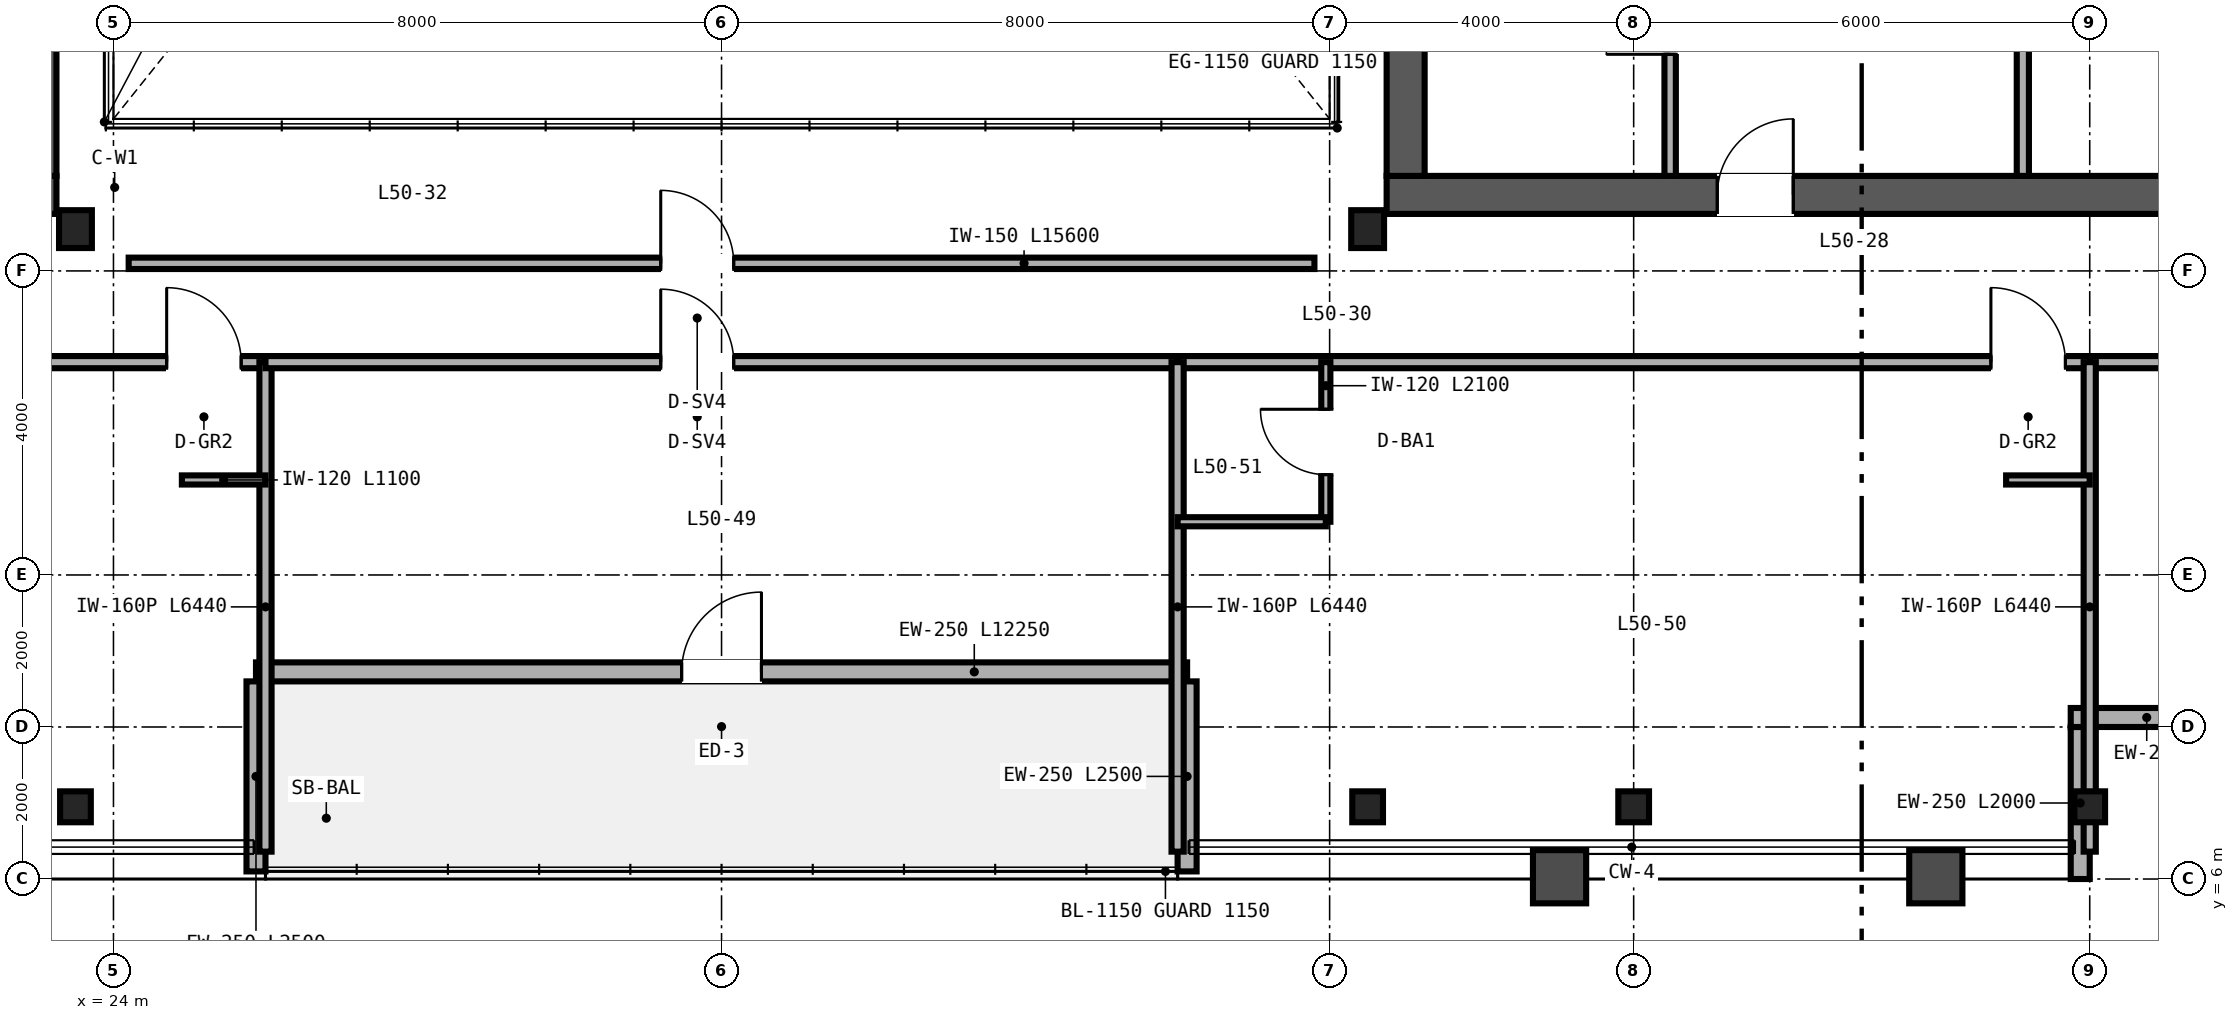
"""IFC4 building model, lengths in metres.
Left out: names, types, materials, properties, quantities, classifications, styles, units other than length and angle.
Written with IfcOpenShell. Run it as: python <this file> out.ifc"""

import sys

from ifc_helpers import new_model, si_unit, direction, frame, frame_2d, origin, origin_2d, place, context, subcontext, project, spatial, rectangle, i_section, extrude, source, transform, mapped, element, fill, save


model = new_model("IFC4")
c1 = context("Model", 3, precision=1e-05, world=origin(), true_north=direction((0.0, 1.0)))
c2 = subcontext(c1, "Body", "Model", "MODEL_VIEW")
j1 = project(units=[si_unit("LENGTHUNIT", "METRE"), si_unit("PLANEANGLEUNIT", "RADIAN")], contexts=[c1])
p1 = place(None, origin())
s1 = spatial("IfcSite", under=j1, at=p1, CompositionType="ELEMENT")
p2 = place(p1, origin())
s2 = spatial("IfcBuilding", under=s1, at=p2, CompositionType="ELEMENT")
p3 = place(p2, frame((0.0, 0.0, 199.2)))
s3 = spatial("IfcBuildingStorey", under=s2, at=p3, CompositionType="ELEMENT", Elevation=199.2)
p4 = place(p3, frame((10.75, 15.0, 0.0), z_axis=(0.0, 0.0, 1.0), x_axis=(1.0, 0.0, 0.0)))
e1 = element("IfcWall", 1, at=p4, inside=s3, PredefinedType="SHEAR", context=c2, shape_type="SweptSolid", body=[
    extrude(rectangle(XDim=12.5, YDim=0.5, at=frame_2d((6.25, 0.0))), origin(), (0.0, 0.0, 1.0), 3.37),
])
p5 = place(p4, frame((10.15, 0.0, 0.0)))
e2 = element("IfcOpeningElement", 2, at=p5, cuts=e1, PredefinedType="OPENING", context=c2, shape_type="SweptSolid", body=[
    extrude(rectangle(XDim=1.0, YDim=2.15, at=frame_2d((0.5, 1.075))), frame((0.0, 0.26, 0.0), z_axis=(0.0, -1.0, 0.0), x_axis=(1.0, 0.0, 0.0)), (0.0, 0.0, 1.0), 0.52),
])
p6 = place(p3, frame((23.0, 15.25, 0.0), z_axis=(0.0, 0.0, 1.0), x_axis=(0.0, 1.0, 0.0)))
e3 = element("IfcWall", 3, at=p6, inside=s3, PredefinedType="SHEAR", context=c2, shape_type="SweptSolid", body=[
    extrude(rectangle(XDim=21.5, YDim=0.5, at=frame_2d((10.75, 0.0))), origin(), (0.0, 0.0, 1.0), 3.37),
])
p7 = place(p3, frame((40.75, 15.0, 0.0), z_axis=(0.0, 0.0, 1.0), x_axis=(1.0, 0.0, 0.0)))
e4 = element("IfcWall", 4, at=p7, inside=s3, PredefinedType="SHEAR", context=c2, shape_type="SweptSolid", body=[
    extrude(rectangle(XDim=12.5, YDim=0.5, at=frame_2d((6.25, 0.0))), origin(), (0.0, 0.0, 1.0), 3.37),
])
p8 = place(p7, frame((4.35, 0.0, 0.0)))
e5 = element("IfcOpeningElement", 5, at=p8, cuts=e4, PredefinedType="OPENING", context=c2, shape_type="SweptSolid", body=[
    extrude(rectangle(XDim=1.0, YDim=2.15, at=frame_2d((0.5, 1.075))), frame((0.0, 0.26, 0.0), z_axis=(0.0, -1.0, 0.0), x_axis=(1.0, 0.0, 0.0)), (0.0, 0.0, 1.0), 0.52),
])
p9 = place(p3, frame((41.0, 15.25, 0.0), z_axis=(0.0, 0.0, 1.0), x_axis=(0.0, 1.0, 0.0)))
e6 = element("IfcWall", 6, at=p9, inside=s3, PredefinedType="SHEAR", context=c2, shape_type="SweptSolid", body=[
    extrude(rectangle(XDim=21.5, YDim=0.5, at=frame_2d((10.75, 0.0))), origin(), (0.0, 0.0, 1.0), 3.37),
])
m1 = source(origin(), c2, "Body", "SweptSolid", [
    extrude(i_section(OverallWidth=0.432, OverallDepth=0.498, WebThickness=0.056, FlangeThickness=0.089, FilletRadius=0.025, at=origin_2d()), origin(), (0.0, 0.0, 1.0), 3.37),
])
for number, where, z_axis, x_axis in (
    (7, (23.5, 14.55, 0.0), (0.0, 0.0, 1.0), (1.0, 0.0, 0.0)),
    (8, (40.5, 14.55, 0.0), (0.0, 0.0, 1.0), (1.0, 0.0, 0.0)),
):
    element("IfcColumn", number, at=place(p3, frame(where, z_axis=z_axis, x_axis=x_axis)), inside=s3, PredefinedType="COLUMN", context=c2, shape_type="MappedRepresentation", body=[
        mapped(m1, transform((0.0, 0.0, 0.0), scale=1.0)),
    ])
m2 = source(origin(), c2, "Body", "SweptSolid", [
    extrude(i_section(OverallWidth=0.404, OverallDepth=0.407, WebThickness=0.027, FlangeThickness=0.044, FilletRadius=0.025, at=origin_2d()), origin(), (0.0, 0.0, 1.0), 3.37),
])
for number, where, z_axis, x_axis in (
    (9, (23.5, 6.95, 0.0), (0.0, 0.0, 1.0), (1.0, 0.0, 0.0)),
    (10, (40.5, 6.95, 0.0), (0.0, 0.0, 1.0), (1.0, 0.0, 0.0)),
    (11, (44.0, 6.95, 0.0), (0.0, 0.0, 1.0), (1.0, 0.0, 0.0)),
    (12, (50.0, 6.95, 0.0), (0.0, 0.0, 1.0), (1.0, 0.0, 0.0)),
):
    element("IfcColumn", number, at=place(p3, frame(where, z_axis=z_axis, x_axis=x_axis)), inside=s3, PredefinedType="COLUMN", context=c2, shape_type="MappedRepresentation", body=[
        mapped(m2, transform((0.0, 0.0, 0.0), scale=1.0)),
    ])
p10 = place(p3, frame((49.875, 6.0, 0.0), z_axis=(0.0, 0.0, 1.0), x_axis=(0.0, 1.0, 0.0)))
e13 = element("IfcWall", 13, at=p10, inside=s3, PredefinedType="SOLIDWALL", context=c2, shape_type="SweptSolid", body=[
    extrude(rectangle(XDim=2.0, YDim=0.25, at=frame_2d((1.0, 0.0))), origin(), (0.0, 0.0, 1.0), 2.677),
])
p11 = place(p3, frame((49.75, 8.125, 0.0), z_axis=(0.0, 0.0, 1.0), x_axis=(1.0, 0.0, 0.0)))
e14 = element("IfcWall", 14, at=p11, inside=s3, PredefinedType="SOLIDWALL", context=c2, shape_type="SweptSolid", body=[
    extrude(rectangle(XDim=2.0, YDim=0.25, at=frame_2d((1.0, 0.0))), origin(), (0.0, 0.0, 1.0), 3.37),
])
p12 = place(p3, frame((25.875, 8.725, 0.0), z_axis=(0.0, 0.0, 1.0), x_axis=(1.0, 0.0, 0.0)))
e15 = element("IfcWall", 15, at=p12, inside=s3, PredefinedType="SOLIDWALL", context=c2, shape_type="SweptSolid", body=[
    extrude(rectangle(XDim=12.25, YDim=0.25, at=frame_2d((6.125, 0.0))), origin(), (0.0, 0.0, 1.0), 3.37),
])
p13 = place(p12, frame((5.6, 0.0, 0.0)))
e16 = element("IfcOpeningElement", 16, at=p13, cuts=e15, PredefinedType="OPENING", context=c2, shape_type="SweptSolid", body=[
    extrude(rectangle(XDim=1.05, YDim=2.15, at=frame_2d((0.525, 1.075))), frame((0.0, 0.135, 0.0), z_axis=(0.0, -1.0, 0.0), x_axis=(1.0, 0.0, 0.0)), (0.0, 0.0, 1.0), 0.27),
])
for number, where, z_axis, x_axis in (
    (17, (25.875, 6.1, 0.0), (0.0, 0.0, 1.0), (0.0, 1.0, 0.0)),
    (18, (38.125, 6.1, 0.0), (0.0, 0.0, 1.0), (0.0, 1.0, 0.0)),
):
    element("IfcWall", number, at=place(p3, frame(where, z_axis=z_axis, x_axis=x_axis)), inside=s3, PredefinedType="SOLIDWALL", context=c2, shape_type="SweptSolid", body=[
        extrude(rectangle(XDim=2.5, YDim=0.25, at=frame_2d((1.25, 0.0))), origin(), (0.0, 0.0, 1.0), 2.443),
    ])
p14 = place(p3, frame((49.12, 15.25, 0.0), z_axis=(0.0, 0.0, 1.0), x_axis=(0.0, 1.0, 0.0)))
e19 = element("IfcWall", 19, at=p14, inside=s3, PredefinedType="PARTITIONING", context=c2, shape_type="SweptSolid", body=[
    extrude(rectangle(XDim=16.13, YDim=0.16, at=frame_2d((8.065, 0.0))), origin(), (0.0, 0.0, 1.0), 2.443),
])
p15 = place(p14, frame((3.8, 0.0, 0.0)))
e20 = element("IfcOpeningElement", 20, at=p15, cuts=e19, PredefinedType="OPENING", context=c2, shape_type="SweptSolid", body=[
    extrude(rectangle(XDim=0.92, YDim=2.15, at=frame_2d((0.46, 1.075))), frame((0.0, 0.09, 0.0), z_axis=(0.0, -1.0, 0.0), x_axis=(1.0, 0.0, 0.0)), (0.0, 0.0, 1.0), 0.18),
])
p16 = place(p14, frame((11.8, 0.0, 0.0)))
e21 = element("IfcOpeningElement", 21, at=p16, cuts=e19, PredefinedType="OPENING", context=c2, shape_type="SweptSolid", body=[
    extrude(rectangle(XDim=0.9, YDim=2.15, at=frame_2d((0.45, 1.075))), frame((0.0, 0.09, 0.0), z_axis=(0.0, -1.0, 0.0), x_axis=(1.0, 0.0, 0.0)), (0.0, 0.0, 1.0), 0.18),
])
p17 = place(p3, frame((44.48, 15.25, 0.0), z_axis=(0.0, 0.0, 1.0), x_axis=(0.0, 1.0, 0.0)))
e22 = element("IfcWall", 22, at=p17, inside=s3, PredefinedType="PARTITIONING", context=c2, shape_type="SweptSolid", body=[
    extrude(rectangle(XDim=11.63, YDim=0.15, at=frame_2d((5.815, 0.0))), origin(), (0.0, 0.0, 1.0), 3.37),
])
p18 = place(p17, frame((1.6, 0.0, 0.0)))
e23 = element("IfcOpeningElement", 23, at=p18, cuts=e22, PredefinedType="OPENING", context=c2, shape_type="SweptSolid", body=[
    extrude(rectangle(XDim=0.84, YDim=2.1, at=frame_2d((0.42, 1.05))), frame((0.0, 0.085, 0.0), z_axis=(0.0, -1.0, 0.0), x_axis=(1.0, 0.0, 0.0)), (0.0, 0.0, 1.0), 0.17),
])
p19 = place(p17, frame((5.85, 0.0, 0.0)))
e24 = element("IfcOpeningElement", 24, at=p19, cuts=e22, PredefinedType="OPENING", context=c2, shape_type="SweptSolid", body=[
    extrude(rectangle(XDim=0.84, YDim=2.1, at=frame_2d((0.42, 1.05))), frame((0.0, 0.085, 0.0), z_axis=(0.0, -1.0, 0.0), x_axis=(1.0, 0.0, 0.0)), (0.0, 0.0, 1.0), 0.17),
])
p20 = place(p17, frame((10.05, 0.0, 0.0)))
e25 = element("IfcOpeningElement", 25, at=p20, cuts=e22, PredefinedType="OPENING", context=c2, shape_type="SweptSolid", body=[
    extrude(rectangle(XDim=0.84, YDim=2.1, at=frame_2d((0.42, 1.05))), frame((0.0, 0.085, 0.0), z_axis=(0.0, -1.0, 0.0), x_axis=(1.0, 0.0, 0.0)), (0.0, 0.0, 1.0), 0.17),
])
p21 = place(p3, frame((24.2, 14.1, 0.0), z_axis=(0.0, 0.0, 1.0), x_axis=(1.0, 0.0, 0.0)))
e26 = element("IfcWall", 26, at=p21, inside=s3, PredefinedType="PARTITIONING", context=c2, shape_type="SweptSolid", body=[
    extrude(rectangle(XDim=15.6, YDim=0.15, at=frame_2d((7.8, 0.0))), origin(), (0.0, 0.0, 1.0), 3.37),
])
p22 = place(p21, frame((7.0, 0.0, 0.0)))
e27 = element("IfcOpeningElement", 27, at=p22, cuts=e26, PredefinedType="OPENING", context=c2, shape_type="SweptSolid", body=[
    extrude(rectangle(XDim=0.96, YDim=2.15, at=frame_2d((0.48, 1.075))), frame((0.0, 0.085, 0.0), z_axis=(0.0, -1.0, 0.0), x_axis=(1.0, 0.0, 0.0)), (0.0, 0.0, 1.0), 0.17),
])
p23 = place(p3, frame((50.0, 12.8, 0.0), z_axis=(0.0, 0.0, 1.0), x_axis=(1.0, 0.0, 0.0)))
e28 = element("IfcWall", 28, at=p23, inside=s3, PredefinedType="PARTITIONING", context=c2, shape_type="SweptSolid", body=[
    extrude(rectangle(XDim=4.0, YDim=0.16, at=frame_2d((2.0, 0.0))), origin(), (0.0, 0.0, 1.0), 3.37),
])
p24 = place(p23, frame((1.52, 0.0, 0.0)))
e29 = element("IfcOpeningElement", 29, at=p24, cuts=e28, PredefinedType="OPENING", context=c2, shape_type="SweptSolid", body=[
    extrude(rectangle(XDim=0.96, YDim=2.15, at=frame_2d((0.48, 1.075))), frame((0.0, 0.09, 0.0), z_axis=(0.0, -1.0, 0.0), x_axis=(1.0, 0.0, 0.0)), (0.0, 0.0, 1.0), 0.18),
])
p25 = place(p3, frame((14.0, 12.8, 0.0), z_axis=(0.0, 0.0, 1.0), x_axis=(1.0, 0.0, 0.0)))
e30 = element("IfcWall", 30, at=p25, inside=s3, PredefinedType="PARTITIONING", context=c2, shape_type="SweptSolid", body=[
    extrude(rectangle(XDim=12.0, YDim=0.16, at=frame_2d((6.0, 0.0))), origin(), (0.0, 0.0, 1.0), 2.913),
])
p26 = place(p25, frame((10.7, 0.0, 0.0)))
e31 = element("IfcOpeningElement", 31, at=p26, cuts=e30, PredefinedType="OPENING", context=c2, shape_type="SweptSolid", body=[
    extrude(rectangle(XDim=0.98, YDim=2.2, at=frame_2d((0.49, 1.1))), frame((0.0, 0.09, 0.0), z_axis=(0.0, -1.0, 0.0), x_axis=(1.0, 0.0, 0.0)), (0.0, 0.0, 1.0), 0.18),
])
p27 = place(p3, frame((26.0, 6.36, 0.0), z_axis=(0.0, 0.0, 1.0), x_axis=(0.0, 1.0, 0.0)))
e32 = element("IfcWall", 32, at=p27, inside=s3, PredefinedType="PARTITIONING", context=c2, shape_type="SweptSolid", body=[
    extrude(rectangle(XDim=6.44, YDim=0.16, at=frame_2d((3.22, 0.0))), origin(), (0.0, 0.0, 1.0), 2.443),
])
p28 = place(p3, frame((24.9, 11.25, 0.0), z_axis=(0.0, 0.0, 1.0), x_axis=(1.0, 0.0, 0.0)))
e33 = element("IfcWall", 33, at=p28, inside=s3, PredefinedType="PARTITIONING", context=c2, shape_type="SweptSolid", body=[
    extrude(rectangle(XDim=1.1, YDim=0.12, at=frame_2d((0.55, 0.0))), origin(), (0.0, 0.0, 1.0), 3.37),
])
p29 = place(p3, frame((26.0, 12.8, 0.0), z_axis=(0.0, 0.0, 1.0), x_axis=(1.0, 0.0, 0.0)))
e34 = element("IfcWall", 34, at=p29, inside=s3, PredefinedType="PARTITIONING", context=c2, shape_type="SweptSolid", body=[
    extrude(rectangle(XDim=12.0, YDim=0.16, at=frame_2d((6.0, 0.0))), origin(), (0.0, 0.0, 1.0), 3.37),
])
p30 = place(p29, frame((5.2, 0.0, 0.0)))
e35 = element("IfcOpeningElement", 35, at=p30, cuts=e34, PredefinedType="OPENING", context=c2, shape_type="SweptSolid", body=[
    extrude(rectangle(XDim=0.96, YDim=2.15, at=frame_2d((0.48, 1.075))), frame((0.0, 0.09, 0.0), z_axis=(0.0, -1.0, 0.0), x_axis=(1.0, 0.0, 0.0)), (0.0, 0.0, 1.0), 0.18),
])
p31 = place(p3, frame((38.0, 12.8, 0.0), z_axis=(0.0, 0.0, 1.0), x_axis=(1.0, 0.0, 0.0)))
e36 = element("IfcWall", 36, at=p31, inside=s3, PredefinedType="PARTITIONING", context=c2, shape_type="SweptSolid", body=[
    extrude(rectangle(XDim=12.0, YDim=0.16, at=frame_2d((6.0, 0.0))), origin(), (0.0, 0.0, 1.0), 2.913),
])
p32 = place(p31, frame((10.7, 0.0, 0.0)))
e37 = element("IfcOpeningElement", 37, at=p32, cuts=e36, PredefinedType="OPENING", context=c2, shape_type="SweptSolid", body=[
    extrude(rectangle(XDim=0.98, YDim=2.2, at=frame_2d((0.49, 1.1))), frame((0.0, 0.09, 0.0), z_axis=(0.0, -1.0, 0.0), x_axis=(1.0, 0.0, 0.0)), (0.0, 0.0, 1.0), 0.18),
])
p33 = place(p3, frame((38.0, 6.36, 0.0), z_axis=(0.0, 0.0, 1.0), x_axis=(0.0, 1.0, 0.0)))
e38 = element("IfcWall", 38, at=p33, inside=s3, PredefinedType="PARTITIONING", context=c2, shape_type="SweptSolid", body=[
    extrude(rectangle(XDim=6.44, YDim=0.16, at=frame_2d((3.22, 0.0))), origin(), (0.0, 0.0, 1.0), 2.443),
])
p34 = place(p3, frame((50.0, 6.36, 0.0), z_axis=(0.0, 0.0, 1.0), x_axis=(0.0, 1.0, 0.0)))
e39 = element("IfcWall", 39, at=p34, inside=s3, PredefinedType="PARTITIONING", context=c2, shape_type="SweptSolid", body=[
    extrude(rectangle(XDim=6.44, YDim=0.16, at=frame_2d((3.22, 0.0))), origin(), (0.0, 0.0, 1.0), 2.677),
])
p35 = place(p3, frame((39.95, 10.7, 0.0), z_axis=(0.0, 0.0, 1.0), x_axis=(0.0, 1.0, 0.0)))
e40 = element("IfcWall", 40, at=p35, inside=s3, PredefinedType="PARTITIONING", context=c2, shape_type="SweptSolid", body=[
    extrude(rectangle(XDim=2.1, YDim=0.12, at=frame_2d((1.05, 0.0))), origin(), (0.0, 0.0, 1.0), 3.37),
])
p36 = place(p35, frame((0.62, 0.0, 0.0)))
e41 = element("IfcOpeningElement", 41, at=p36, cuts=e40, PredefinedType="OPENING", context=c2, shape_type="SweptSolid", body=[
    extrude(rectangle(XDim=0.86, YDim=2.1, at=frame_2d((0.43, 1.05))), frame((0.0, 0.07, 0.0), z_axis=(0.0, -1.0, 0.0), x_axis=(1.0, 0.0, 0.0)), (0.0, 0.0, 1.0), 0.14),
])
p37 = place(p3, frame((38.0, 10.7, 0.0), z_axis=(0.0, 0.0, 1.0), x_axis=(1.0, 0.0, 0.0)))
e42 = element("IfcWall", 42, at=p37, inside=s3, PredefinedType="PARTITIONING", context=c2, shape_type="SweptSolid", body=[
    extrude(rectangle(XDim=1.95, YDim=0.12, at=frame_2d((0.975, 0.0))), origin(), (0.0, 0.0, 1.0), 3.37),
])
p38 = place(p3, frame((48.9, 11.25, 0.0), z_axis=(0.0, 0.0, 1.0), x_axis=(1.0, 0.0, 0.0)))
e43 = element("IfcWall", 43, at=p38, inside=s3, PredefinedType="PARTITIONING", context=c2, shape_type="SweptSolid", body=[
    extrude(rectangle(XDim=1.1, YDim=0.12, at=frame_2d((0.55, 0.0))), origin(), (0.0, 0.0, 1.0), 3.37),
])
m3 = source(origin(), c2, "Body", "SweptSolid", [
    extrude(rectangle(XDim=1.05, YDim=2.15, at=frame_2d((0.525, 1.075))), frame((0.0, 0.025, 0.0), z_axis=(0.0, -1.0, 0.0), x_axis=(1.0, 0.0, 0.0)), (0.0, 0.0, 1.0), 0.05),
])
p39 = place(p13, origin())
e44 = element("IfcDoor", 44, at=p39, inside=s3, OperationType="SINGLE_SWING_RIGHT", PredefinedType="DOOR", context=c2, shape_type="MappedRepresentation", body=[
    mapped(m3, transform((0.0, 0.0, 0.0), scale=1.0)),
])
fill(e16, e44)
m4 = source(origin(), c2, "Body", "SweptSolid", [
    extrude(rectangle(XDim=1.0, YDim=2.15, at=frame_2d((0.5, 1.075))), frame((0.0, 0.025, 0.0), z_axis=(0.0, -1.0, 0.0), x_axis=(1.0, 0.0, 0.0)), (0.0, 0.0, 1.0), 0.05),
])
p40 = place(p8, origin())
e45 = element("IfcDoor", 45, at=p40, inside=s3, OperationType="SINGLE_SWING_RIGHT", PredefinedType="DOOR", context=c2, shape_type="MappedRepresentation", body=[
    mapped(m4, transform((0.0, 0.0, 0.0), scale=1.0)),
])
fill(e5, e45)
m5 = source(origin(), c2, "Body", "SweptSolid", [
    extrude(rectangle(XDim=0.84, YDim=2.1, at=frame_2d((0.42, 1.05))), frame((0.0, 0.025, 0.0), z_axis=(0.0, -1.0, 0.0), x_axis=(1.0, 0.0, 0.0)), (0.0, 0.0, 1.0), 0.05),
])
p41 = place(p18, origin())
e46 = element("IfcDoor", 46, at=p41, inside=s3, OperationType="SINGLE_SWING_LEFT", PredefinedType="DOOR", context=c2, shape_type="MappedRepresentation", body=[
    mapped(m5, transform((0.0, 0.0, 0.0), scale=1.0)),
])
fill(e23, e46)
m6 = source(origin(), c2, "Body", "SweptSolid", [
    extrude(rectangle(XDim=0.96, YDim=2.15, at=frame_2d((0.48, 1.075))), frame((0.0, 0.025, 0.0), z_axis=(0.0, -1.0, 0.0), x_axis=(1.0, 0.0, 0.0)), (0.0, 0.0, 1.0), 0.05),
])
p42 = place(p22, origin())
e47 = element("IfcDoor", 47, at=p42, inside=s3, OperationType="SINGLE_SWING_LEFT", PredefinedType="DOOR", context=c2, shape_type="MappedRepresentation", body=[
    mapped(m6, transform((0.0, 0.0, 0.0), scale=1.0)),
])
fill(e27, e47)
m7 = source(origin(), c2, "Body", "SweptSolid", [
    extrude(rectangle(XDim=0.98, YDim=2.2, at=frame_2d((0.49, 1.1))), frame((0.0, 0.025, 0.0), z_axis=(0.0, -1.0, 0.0), x_axis=(1.0, 0.0, 0.0)), (0.0, 0.0, 1.0), 0.05),
])
p43 = place(p26, origin())
e48 = element("IfcDoor", 48, at=p43, inside=s3, OperationType="SINGLE_SWING_LEFT", PredefinedType="DOOR", context=c2, shape_type="MappedRepresentation", body=[
    mapped(m7, transform((0.0, 0.0, 0.0), scale=1.0)),
])
fill(e31, e48)
p44 = place(p30, origin())
e49 = element("IfcDoor", 49, at=p44, inside=s3, OperationType="SINGLE_SWING_LEFT", PredefinedType="DOOR", context=c2, shape_type="MappedRepresentation", body=[
    mapped(m6, transform((0.0, 0.0, 0.0), scale=1.0)),
])
fill(e35, e49)
m8 = source(origin(), c2, "Body", "SweptSolid", [
    extrude(rectangle(XDim=0.86, YDim=2.1, at=frame_2d((0.43, 1.05))), frame((0.0, 0.025, 0.0), z_axis=(0.0, -1.0, 0.0), x_axis=(1.0, 0.0, 0.0)), (0.0, 0.0, 1.0), 0.05),
])
p45 = place(p36, origin())
e50 = element("IfcDoor", 50, at=p45, inside=s3, OperationType="SINGLE_SWING_RIGHT", PredefinedType="DOOR", context=c2, shape_type="MappedRepresentation", body=[
    mapped(m8, transform((0.0, 0.0, 0.0), scale=1.0)),
])
fill(e41, e50)
p46 = place(p32, origin())
e51 = element("IfcDoor", 51, at=p46, inside=s3, OperationType="SINGLE_SWING_LEFT", PredefinedType="DOOR", context=c2, shape_type="MappedRepresentation", body=[
    mapped(m7, transform((0.0, 0.0, 0.0), scale=1.0)),
])
fill(e37, e51)
save(model, sys.argv[1])
